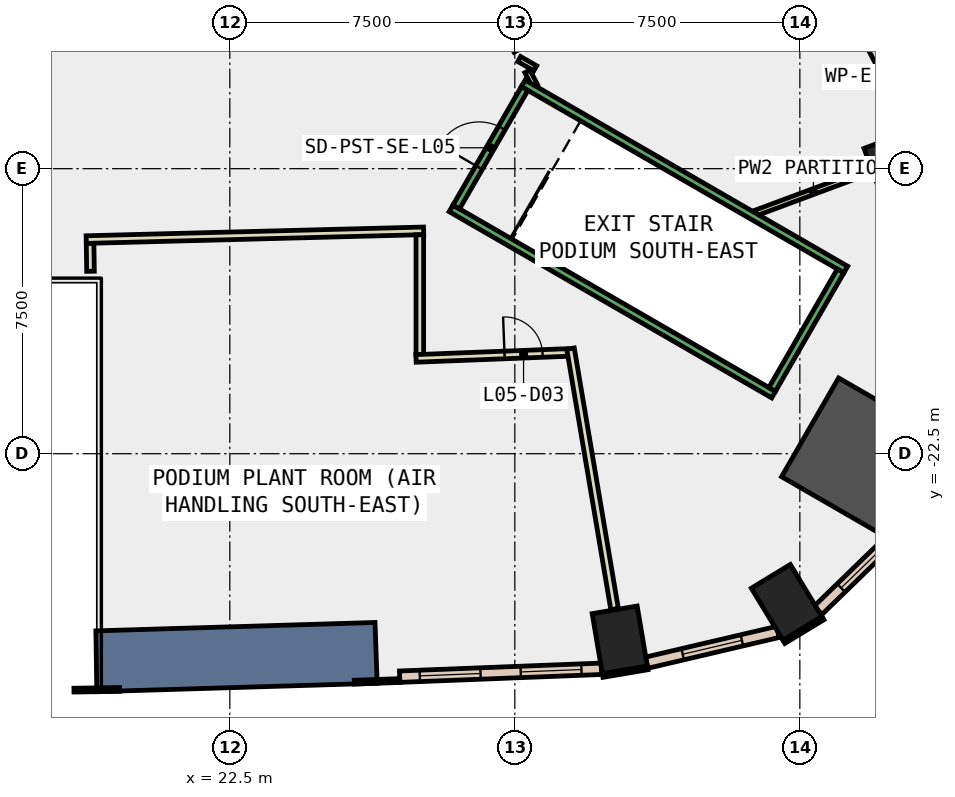
"""IFC4 building model, lengths in metres.
Left out: names, types, materials, properties, quantities, classifications, styles, units other than length and angle.
Written with IfcOpenShell. Run it as: python <this file> out.ifc"""

import sys

from ifc_helpers import new_model, si_unit, direction, frame, frame_2d, origin, origin_2d, place, context, subcontext, project, spatial, polyline, rectangle, outline, extrude, element, fill, save


model = new_model("IFC4")
c1 = context("Model", 3, precision=1e-05, world=origin(), true_north=direction((0.0, 1.0)))
c2 = subcontext(c1, "Body", "Model", "MODEL_VIEW")
j1 = project(units=[si_unit("LENGTHUNIT", "METRE"), si_unit("PLANEANGLEUNIT", "RADIAN")], contexts=[c1])
p1 = place(None, origin())
s1 = spatial("IfcSite", under=j1, at=p1, CompositionType="ELEMENT")
p2 = place(p1, origin())
s2 = spatial("IfcBuilding", under=s1, at=p2, CompositionType="ELEMENT")
p3 = place(p2, frame((0.0, 0.0, 30.0)))
s3 = spatial("IfcBuildingStorey", under=s2, at=p3, CompositionType="ELEMENT", Elevation=30.0)
for number, where, z_axis, x_axis in (
    (1, (32.761, -27.397, -0.45), (0.0, 0.0, 1.0), (0.986, 0.167, 0.0)),
    (2, (37.152, -26.411, -0.45), (0.0, 0.0, 1.0), (0.855, 0.519, 0.0)),
):
    element("IfcColumn", number, at=place(p3, frame(where, z_axis=z_axis, x_axis=x_axis)), inside=s3, PredefinedType="COLUMN", context=c2, shape_type="SweptSolid", body=[
        extrude(rectangle(XDim=1.2, YDim=1.6, at=origin_2d()), origin(), (0.0, 0.0, 1.0), 4.85),
    ])
p4 = place(p3, frame((39.069, -22.556, -0.45), z_axis=(0.0, 0.0, 1.0), x_axis=(-0.866025403784, 0.5, 0.0)))
e3 = element("IfcColumn", 3, at=p4, inside=s3, PredefinedType="COLUMN", context=c2, shape_type="SweptSolid", body=[
    extrude(rectangle(XDim=3.0, YDim=3.0, at=origin_2d()), origin(), (0.0, 0.0, 1.0), 4.85),
])
p5 = place(p3, frame((40.147, -14.751, -0.45), z_axis=(0.0, 0.0, 1.0), x_axis=(-0.348277574304, 0.937391450375, 0.0)))
e4 = element("IfcColumn", 4, at=p5, inside=s3, PredefinedType="COLUMN", context=c2, shape_type="SweptSolid", body=[
    extrude(rectangle(XDim=1.2, YDim=1.6, at=origin_2d()), origin(), (0.0, 0.0, 1.0), 4.85),
])
p6 = place(p3, frame((0.0, 0.0, -0.45)))
e5 = element("IfcWall", 5, at=p6, inside=s3, PredefinedType="SHEAR", context=c2, shape_type="SweptSolid", body=[
    extrude(outline(polyline([(19.0, -28.762), (26.377, -28.54), (26.321, -26.941), (18.976, -27.162), (19.0, -28.762)])), origin(), (0.0, 0.0, 1.0), 4.85),
])
p7 = place(p3, frame((18.399, -28.721, 0.0), z_axis=(0.0, 0.0, 1.0), x_axis=(0.999886724523, 0.015051183404, 0.0)))
e6 = element("IfcWall", 6, at=p7, inside=s3, PredefinedType="STANDARD", context=c2, shape_type="SweptSolid", body=[
    extrude(rectangle(XDim=1.2, YDim=0.1, at=frame_2d((0.6, 0.0))), origin(), (0.0, 0.0, 1.0), 4.4),
])
p8 = place(p3, frame((25.776, -28.511, 0.0), z_axis=(0.0, 0.0, 1.0), x_axis=(0.999387493042, 0.034994838926, 0.0)))
e7 = element("IfcWall", 7, at=p8, inside=s3, PredefinedType="STANDARD", context=c2, shape_type="SweptSolid", body=[
    extrude(rectangle(XDim=1.2, YDim=0.1, at=frame_2d((0.6, 0.0))), origin(), (0.0, 0.0, 1.0), 4.4),
])
p9 = place(p3, frame((32.311, -28.335, 0.0), z_axis=(0.0, 0.0, 1.0), x_axis=(0.986011774526, 0.166675674579, 0.0)))
e8 = element("IfcWall", 8, at=p9, inside=s3, PredefinedType="STANDARD", context=c2, shape_type="SweptSolid", body=[
    extrude(rectangle(XDim=1.2, YDim=0.1, at=frame_2d((0.6, 0.0))), origin(), (0.0, 0.0, 1.0), 4.4),
])
p10 = place(p3, frame((37.08, -27.449, 0.0), z_axis=(0.0, 0.0, 1.0), x_axis=(0.854716608594, 0.519094903649, 0.0)))
e9 = element("IfcWall", 9, at=p10, inside=s3, PredefinedType="STANDARD", context=c2, shape_type="SweptSolid", body=[
    extrude(rectangle(XDim=1.2, YDim=0.1, at=frame_2d((0.6, 0.0))), origin(), (0.0, 0.0, 1.0), 4.4),
])
p11 = place(p3, frame((26.97, -28.367, 0.0), z_axis=(0.0, 0.0, 1.0), x_axis=(0.999234205654, 0.039128023863, 0.0)))
e10 = element("IfcWall", 10, at=p11, inside=s3, PredefinedType="STANDARD", context=c2, shape_type="SweptSolid", body=[
    extrude(rectangle(XDim=5.316, YDim=0.3, at=frame_2d((2.658, 0.0))), origin(), (0.0, 0.0, 1.0), 4.4),
])
p12 = place(p11, frame((0.529, 0.0, 1.0)))
e11 = element("IfcOpeningElement", 11, at=p12, cuts=e10, PredefinedType="OPENING", context=c2, shape_type="SweptSolid", body=[
    extrude(rectangle(XDim=1.6, YDim=3.2, at=frame_2d((0.8, 1.6))), frame((0.0, 0.16, 0.0), z_axis=(0.0, -1.0, 0.0), x_axis=(1.0, 0.0, 0.0)), (0.0, 0.0, 1.0), 0.32),
])
p13 = place(p11, frame((3.187, 0.0, 1.0)))
e12 = element("IfcOpeningElement", 12, at=p13, cuts=e10, PredefinedType="OPENING", context=c2, shape_type="SweptSolid", body=[
    extrude(rectangle(XDim=1.6, YDim=3.2, at=frame_2d((0.8, 1.6))), frame((0.0, 0.16, 0.0), z_axis=(0.0, -1.0, 0.0), x_axis=(1.0, 0.0, 0.0)), (0.0, 0.0, 1.0), 0.32),
])
p14 = place(p3, frame((33.47, -27.999, 0.0), z_axis=(0.0, 0.0, 1.0), x_axis=(0.97357041301, 0.228387063799, 0.0)))
e13 = element("IfcWall", 13, at=p14, inside=s3, PredefinedType="STANDARD", context=c2, shape_type="SweptSolid", body=[
    extrude(rectangle(XDim=3.547, YDim=0.3, at=frame_2d((1.773, 0.0))), origin(), (0.0, 0.0, 1.0), 4.4),
])
p15 = place(p14, frame((0.973, 0.0, 1.0)))
e14 = element("IfcOpeningElement", 14, at=p15, cuts=e13, PredefinedType="OPENING", context=c2, shape_type="SweptSolid", body=[
    extrude(rectangle(XDim=1.6, YDim=3.2, at=frame_2d((0.8, 1.6))), frame((0.0, 0.16, 0.0), z_axis=(0.0, -1.0, 0.0), x_axis=(1.0, 0.0, 0.0)), (0.0, 0.0, 1.0), 0.32),
])
p16 = place(p3, frame((37.98, -26.621, 0.0), z_axis=(0.0, 0.0, 1.0), x_axis=(0.717527250225, 0.696530433782, 0.0)))
e15 = element("IfcWall", 15, at=p16, inside=s3, PredefinedType="STANDARD", context=c2, shape_type="SweptSolid", body=[
    extrude(rectangle(XDim=3.291, YDim=0.3, at=frame_2d((1.645, 0.0))), origin(), (0.0, 0.0, 1.0), 4.4),
])
p17 = place(p16, frame((0.845, 0.0, 1.0)))
e16 = element("IfcOpeningElement", 16, at=p17, cuts=e15, PredefinedType="OPENING", context=c2, shape_type="SweptSolid", body=[
    extrude(rectangle(XDim=1.6, YDim=3.2, at=frame_2d((0.8, 1.6))), frame((0.0, 0.16, 0.0), z_axis=(0.0, -1.0, 0.0), x_axis=(1.0, 0.0, 0.0)), (0.0, 0.0, 1.0), 0.32),
])
p18 = place(p3, frame((40.568, -13.956, 0.0), z_axis=(0.0, 0.0, 1.0), x_axis=(-0.466125129602, 0.884718804792, 0.0)))
e17 = element("IfcWall", 17, at=p18, inside=s3, PredefinedType="STANDARD", context=c2, shape_type="SweptSolid", body=[
    extrude(rectangle(XDim=6.164, YDim=0.3, at=frame_2d((3.082, 0.0))), origin(), (0.0, 0.0, 1.0), 4.4),
])
p19 = place(p18, frame((0.541, 0.0, 1.0)))
e18 = element("IfcOpeningElement", 18, at=p19, cuts=e17, PredefinedType="OPENING", context=c2, shape_type="SweptSolid", body=[
    extrude(rectangle(XDim=2.0, YDim=3.2, at=frame_2d((1.0, 1.6))), frame((0.0, 0.16, 0.0), z_axis=(0.0, -1.0, 0.0), x_axis=(1.0, 0.0, 0.0)), (0.0, 0.0, 1.0), 0.32),
])
p20 = place(p18, frame((3.623, 0.0, 1.0)))
e19 = element("IfcOpeningElement", 19, at=p20, cuts=e17, PredefinedType="OPENING", context=c2, shape_type="SweptSolid", body=[
    extrude(rectangle(XDim=2.0, YDim=3.2, at=frame_2d((1.0, 1.6))), frame((0.0, 0.16, 0.0), z_axis=(0.0, -1.0, 0.0), x_axis=(1.0, 0.0, 0.0)), (0.0, 0.0, 1.0), 0.32),
])
p21 = place(p3, frame((18.834, -17.7, 0.0), z_axis=(0.0, 0.0, 1.0), x_axis=(-0.014903942317, 0.999888930083, 0.0)))
e20 = element("IfcWall", 20, at=p21, inside=s3, PredefinedType="PARTITIONING", context=c2, shape_type="SweptSolid", body=[
    extrude(rectangle(XDim=0.737, YDim=0.2, at=frame_2d((0.369, 0.0))), origin(), (0.0, 0.0, 1.0), 4.4),
])
p22 = place(p3, frame((18.722, -16.866, 0.0), z_axis=(0.0, 0.0, 1.0), x_axis=(0.999664659407, 0.025895341927, 0.0)))
e21 = element("IfcWall", 21, at=p22, inside=s3, PredefinedType="PARTITIONING", context=c2, shape_type="SweptSolid", body=[
    extrude(rectangle(XDim=8.881, YDim=0.2, at=frame_2d((4.44, 0.0))), origin(), (0.0, 0.0, 1.0), 4.4),
])
p23 = place(p3, frame((27.5, -16.739, 0.0), z_axis=(0.0, 0.0, 1.0), x_axis=(0.0, -1.0, 0.0)))
e22 = element("IfcWall", 22, at=p23, inside=s3, PredefinedType="PARTITIONING", context=c2, shape_type="SweptSolid", body=[
    extrude(rectangle(XDim=3.15, YDim=0.2, at=frame_2d((1.575, 0.0))), origin(), (0.0, 0.0, 1.0), 4.4),
])
p24 = place(p3, frame((27.4, -19.993, 0.0), z_axis=(0.0, 0.0, 1.0), x_axis=(0.999233502058, 0.03914598785, 0.0)))
e23 = element("IfcWall", 23, at=p24, inside=s3, PredefinedType="PARTITIONING", context=c2, shape_type="SweptSolid", body=[
    extrude(rectangle(XDim=3.985, YDim=0.2, at=frame_2d((1.993, 0.0))), origin(), (0.0, 0.0, 1.0), 4.4),
])
p25 = place(p24, frame((2.332, 0.0, 0.0)))
e24 = element("IfcOpeningElement", 24, at=p25, cuts=e23, PredefinedType="OPENING", context=c2, shape_type="SweptSolid", body=[
    extrude(rectangle(XDim=1.0, YDim=2.1, at=frame_2d((0.5, 1.05))), frame((0.0, 0.11, 0.0), z_axis=(0.0, -1.0, 0.0), x_axis=(1.0, 0.0, 0.0)), (0.0, 0.0, 1.0), 0.22),
])
p26 = place(p3, frame((31.465, -19.734, 0.0), z_axis=(0.0, 0.0, 1.0), x_axis=(0.166858828969, -0.985980796565, 0.0)))
e25 = element("IfcWall", 25, at=p26, inside=s3, PredefinedType="PARTITIONING", context=c2, shape_type="SweptSolid", body=[
    extrude(rectangle(XDim=6.951, YDim=0.2, at=frame_2d((3.476, 0.0))), origin(), (0.0, 0.0, 1.0), 4.4),
])
p27 = place(p3, frame((39.378, -15.037, 0.0), z_axis=(0.0, 0.0, 1.0), x_axis=(-0.937400028274, -0.348254485961, 0.0)))
e26 = element("IfcWall", 26, at=p27, inside=s3, PredefinedType="PARTITIONING", context=c2, shape_type="SweptSolid", body=[
    extrude(rectangle(XDim=3.247, YDim=0.15, at=frame_2d((1.624, 0.0))), origin(), (0.0, 0.0, 1.0), 4.4),
])
p28 = place(p3, frame((30.528, -12.816, 0.0), z_axis=(0.0, 0.0, 1.0), x_axis=(-0.465959538506, 0.884806028729, 0.0)))
e27 = element("IfcWall", 27, at=p28, inside=s3, PredefinedType="PARTITIONING", context=c2, shape_type="SweptSolid", body=[
    extrude(rectangle(XDim=0.425, YDim=0.15, at=frame_2d((0.212, 0.0))), origin(), (0.0, 0.0, 1.0), 4.4),
])
p29 = place(p3, frame((30.537, -12.358, 0.0), z_axis=(0.0, 0.0, 1.0), x_axis=(-0.86759393416, 0.497273330684, 0.0)))
e28 = element("IfcWall", 28, at=p29, inside=s3, PredefinedType="PARTITIONING", context=c2, shape_type="SweptSolid", body=[
    extrude(rectangle(XDim=0.487, YDim=0.15, at=frame_2d((0.243, 0.0))), origin(), (0.0, 0.0, 1.0), 4.4),
])
for number, where, z_axis, x_axis in (
    (29, (28.322, -16.045, 0.0), (0.0, 0.0, 1.0), (0.866, -0.5, 0.0)),
    (30, (30.222, -12.755, 0.0), (0.0, 0.0, 1.0), (0.866, -0.5, 0.0)),
):
    element("IfcWall", number, at=place(p3, frame(where, z_axis=z_axis, x_axis=x_axis)), inside=s3, PredefinedType="STANDARD", context=c2, shape_type="SweptSolid", body=[
        extrude(rectangle(XDim=9.8, YDim=0.2, at=frame_2d((4.9, 0.0))), origin(), (0.0, 0.0, 1.0), 3.2),
    ])
p30 = place(p3, frame((28.458, -16.009, 0.0), z_axis=(0.0, 0.0, 1.0), x_axis=(0.499982693035, 0.866035395735, 0.0)))
e31 = element("IfcWall", 31, at=p30, inside=s3, PredefinedType="STANDARD", context=c2, shape_type="SweptSolid", body=[
    extrude(rectangle(XDim=3.6, YDim=0.2, at=frame_2d((1.8, 0.0))), origin(), (0.0, 0.0, 1.0), 3.2),
])
p31 = place(p30, frame((1.2, 0.0, 0.0)))
e32 = element("IfcOpeningElement", 32, at=p31, cuts=e31, PredefinedType="OPENING", context=c2, shape_type="SweptSolid", body=[
    extrude(rectangle(XDim=1.2, YDim=2.2, at=frame_2d((0.6, 1.1))), frame((0.0, 0.11, 0.0), z_axis=(0.0, -1.0, 0.0), x_axis=(1.0, 0.0, 0.0)), (0.0, 0.0, 1.0), 0.22),
])
p32 = place(p3, frame((36.772, -20.809, 0.0), z_axis=(0.0, 0.0, 1.0), x_axis=(0.49995333141, 0.866052346231, 0.0)))
e33 = element("IfcWall", 33, at=p32, inside=s3, PredefinedType="STANDARD", context=c2, shape_type="SweptSolid", body=[
    extrude(rectangle(XDim=3.6, YDim=0.2, at=frame_2d((1.8, 0.0))), origin(), (0.0, 0.0, 1.0), 3.2),
])
p33 = place(p12, origin())
e34 = element("IfcWindow", 34, at=p33, inside=s3, PartitioningType="SINGLE_PANEL", PredefinedType="WINDOW", context=c2, shape_type="SweptSolid", body=[
    extrude(rectangle(XDim=1.6, YDim=3.2, at=frame_2d((0.8, 1.6))), frame((0.0, 0.03, 0.0), z_axis=(0.0, -1.0, 0.0), x_axis=(1.0, 0.0, 0.0)), (0.0, 0.0, 1.0), 0.06),
])
fill(e11, e34)
p34 = place(p13, origin())
e35 = element("IfcWindow", 35, at=p34, inside=s3, PartitioningType="SINGLE_PANEL", PredefinedType="WINDOW", context=c2, shape_type="SweptSolid", body=[
    extrude(rectangle(XDim=1.6, YDim=3.2, at=frame_2d((0.8, 1.6))), frame((0.0, 0.03, 0.0), z_axis=(0.0, -1.0, 0.0), x_axis=(1.0, 0.0, 0.0)), (0.0, 0.0, 1.0), 0.06),
])
fill(e12, e35)
p35 = place(p15, origin())
e36 = element("IfcWindow", 36, at=p35, inside=s3, PartitioningType="SINGLE_PANEL", PredefinedType="WINDOW", context=c2, shape_type="SweptSolid", body=[
    extrude(rectangle(XDim=1.6, YDim=3.2, at=frame_2d((0.8, 1.6))), frame((0.0, 0.03, 0.0), z_axis=(0.0, -1.0, 0.0), x_axis=(1.0, 0.0, 0.0)), (0.0, 0.0, 1.0), 0.06),
])
fill(e14, e36)
p36 = place(p17, origin())
e37 = element("IfcWindow", 37, at=p36, inside=s3, PartitioningType="SINGLE_PANEL", PredefinedType="WINDOW", context=c2, shape_type="SweptSolid", body=[
    extrude(rectangle(XDim=1.6, YDim=3.2, at=frame_2d((0.8, 1.6))), frame((0.0, 0.03, 0.0), z_axis=(0.0, -1.0, 0.0), x_axis=(1.0, 0.0, 0.0)), (0.0, 0.0, 1.0), 0.06),
])
fill(e16, e37)
p37 = place(p19, origin())
e38 = element("IfcWindow", 38, at=p37, inside=s3, PartitioningType="SINGLE_PANEL", PredefinedType="WINDOW", context=c2, shape_type="SweptSolid", body=[
    extrude(rectangle(XDim=2.0, YDim=3.2, at=frame_2d((1.0, 1.6))), frame((0.0, 0.03, 0.0), z_axis=(0.0, -1.0, 0.0), x_axis=(1.0, 0.0, 0.0)), (0.0, 0.0, 1.0), 0.06),
])
fill(e18, e38)
p38 = place(p25, origin())
e39 = element("IfcDoor", 39, at=p38, inside=s3, OperationType="SINGLE_SWING_RIGHT", PredefinedType="DOOR", context=c2, shape_type="SweptSolid", body=[
    extrude(rectangle(XDim=1.0, YDim=2.1, at=frame_2d((0.5, 1.05))), frame((0.0, 0.025, 0.0), z_axis=(0.0, -1.0, 0.0), x_axis=(1.0, 0.0, 0.0)), (0.0, 0.0, 1.0), 0.05),
])
fill(e24, e39)
p39 = place(p31, origin())
e40 = element("IfcDoor", 40, at=p39, inside=s3, OperationType="SINGLE_SWING_LEFT", PredefinedType="DOOR", context=c2, shape_type="SweptSolid", body=[
    extrude(rectangle(XDim=1.2, YDim=2.2, at=frame_2d((0.6, 1.1))), frame((0.0, 0.025, 0.0), z_axis=(0.0, -1.0, 0.0), x_axis=(1.0, 0.0, 0.0)), (0.0, 0.0, 1.0), 0.05),
])
fill(e32, e40)
save(model, sys.argv[1])
